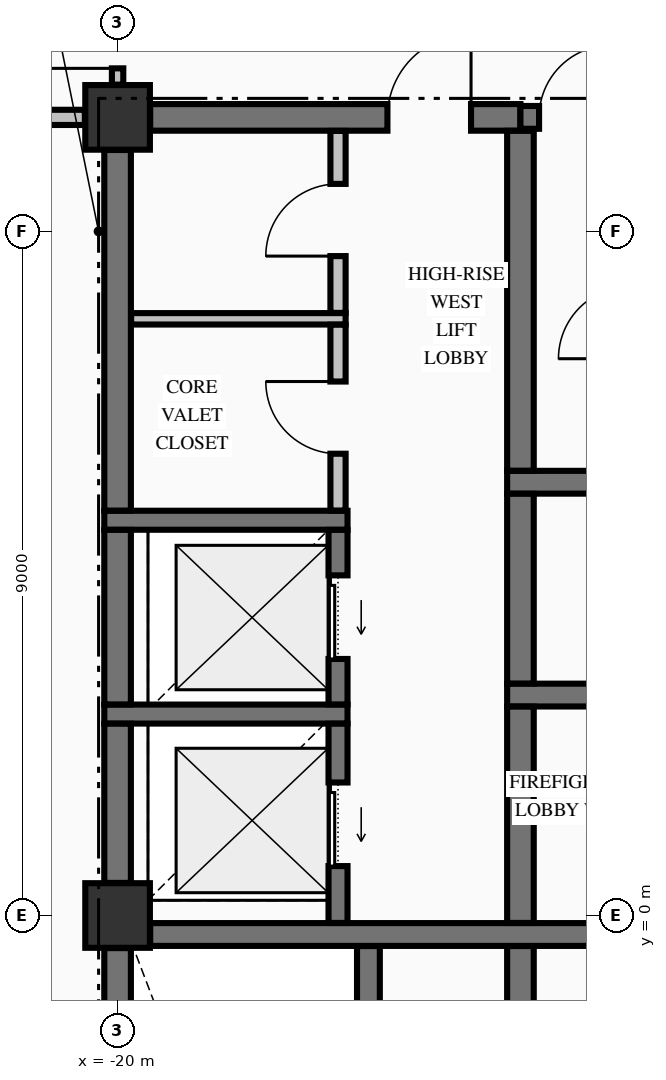
"""IFC4 building model, lengths in metres.
Left out: names, types, materials, properties, quantities, classifications, styles, units other than length and angle.
Written with IfcOpenShell. Run it as: python <this file> out.ifc"""

import sys

from ifc_helpers import new_model, si_unit, direction, frame, frame_2d, origin, origin_2d, place, context, subcontext, project, spatial, rectangle, extrude, element, fill, save


model = new_model("IFC4")
c1 = context("Model", 3, precision=1e-05, world=origin(), true_north=direction((0.0, 1.0)))
c2 = subcontext(c1, "Body", "Model", "MODEL_VIEW")
j1 = project(units=[si_unit("LENGTHUNIT", "METRE"), si_unit("PLANEANGLEUNIT", "RADIAN")], contexts=[c1])
p1 = place(None, origin())
s1 = spatial("IfcSite", under=j1, at=p1, CompositionType="ELEMENT")
p2 = place(p1, origin())
s2 = spatial("IfcBuilding", under=s1, at=p2, CompositionType="ELEMENT")
p3 = place(p2, frame((0.0, 0.0, 198.26)))
s3 = spatial("IfcBuildingStorey", under=s2, at=p3, CompositionType="ELEMENT", Elevation=198.26)
for number, where, z_axis, x_axis in (
    (1, (-20.0, 10.5, -0.25), (0.0, 0.0, 1.0), (1.0, 0.0, 0.0)),
    (2, (-20.0, 0.0, -0.25), (0.0, 0.0, 1.0), (1.0, 0.0, 0.0)),
):
    element("IfcColumn", number, at=place(p3, frame(where, z_axis=z_axis, x_axis=x_axis)), inside=s3, PredefinedType="COLUMN", context=c2, shape_type="SweptSolid", body=[
        extrude(rectangle(XDim=0.85, YDim=0.85, at=origin_2d()), origin(), (0.0, 0.0, 1.0), 3.4),
    ])
p4 = place(p3, frame((-19.571, -0.25, 0.0), z_axis=(0.0, 0.0, 1.0), x_axis=(1.0, 0.0, 0.0)))
e3 = element("IfcWall", 3, at=p4, inside=s3, PredefinedType="SHEAR", context=c2, shape_type="SweptSolid", body=[
    extrude(rectangle(XDim=8.142, YDim=0.3, at=frame_2d((4.071, 0.0))), origin(), (0.0, 0.0, 1.0), 3.15),
])
p5 = place(p4, frame((5.871, 0.0, 0.0)))
e4 = element("IfcOpeningElement", 4, at=p5, cuts=e3, PredefinedType="OPENING", context=c2, shape_type="SweptSolid", body=[
    extrude(rectangle(XDim=1.1, YDim=2.15, at=frame_2d((0.55, 1.075))), frame((0.0, 0.16, 0.0), z_axis=(0.0, -1.0, 0.0), x_axis=(1.0, 0.0, 0.0)), (0.0, 0.0, 1.0), 0.32),
])
p6 = place(p3, frame((-20.175, 2.65, 0.0), z_axis=(0.0, 0.0, 1.0), x_axis=(1.0, 0.0, 0.0)))
e5 = element("IfcWall", 5, at=p6, inside=s3, PredefinedType="SOLIDWALL", context=c2, shape_type="SweptSolid", body=[
    extrude(rectangle(XDim=3.2, YDim=0.25, at=frame_2d((1.6, 0.0))), origin(), (0.0, 0.0, 1.0), 3.15),
])
p7 = place(p3, frame((-14.875, 2.9, 0.0), z_axis=(0.0, 0.0, 1.0), x_axis=(1.0, 0.0, 0.0)))
e6 = element("IfcWall", 6, at=p7, inside=s3, PredefinedType="SHEAR", context=c2, shape_type="SweptSolid", body=[
    extrude(rectangle(XDim=4.025, YDim=0.3, at=frame_2d((2.012, 0.0))), origin(), (0.0, 0.0, 1.0), 3.15),
])
p8 = place(p7, frame((2.075, 0.0, 0.0)))
e7 = element("IfcOpeningElement", 7, at=p8, cuts=e6, PredefinedType="OPENING", context=c2, shape_type="SweptSolid", body=[
    extrude(rectangle(XDim=1.1, YDim=2.2, at=frame_2d((0.55, 1.1))), frame((0.0, 0.16, 0.0), z_axis=(0.0, -1.0, 0.0), x_axis=(1.0, 0.0, 0.0)), (0.0, 0.0, 1.0), 0.32),
])
p9 = place(p3, frame((-20.175, 5.2, 0.0), z_axis=(0.0, 0.0, 1.0), x_axis=(1.0, 0.0, 0.0)))
e8 = element("IfcWall", 8, at=p9, inside=s3, PredefinedType="SOLIDWALL", context=c2, shape_type="SweptSolid", body=[
    extrude(rectangle(XDim=3.2, YDim=0.25, at=frame_2d((1.6, 0.0))), origin(), (0.0, 0.0, 1.0), 3.15),
])
p10 = place(p3, frame((-14.875, 5.7, 0.0), z_axis=(0.0, 0.0, 1.0), x_axis=(1.0, 0.0, 0.0)))
e9 = element("IfcWall", 9, at=p10, inside=s3, PredefinedType="SHEAR", context=c2, shape_type="SweptSolid", body=[
    extrude(rectangle(XDim=4.025, YDim=0.3, at=frame_2d((2.012, 0.0))), origin(), (0.0, 0.0, 1.0), 3.15),
])
p11 = place(p3, frame((-19.571, 10.5, 0.0), z_axis=(0.0, 0.0, 1.0), x_axis=(1.0, 0.0, 0.0)))
e10 = element("IfcWall", 10, at=p11, inside=s3, PredefinedType="SHEAR", context=c2, shape_type="SweptSolid", body=[
    extrude(rectangle(XDim=4.871, YDim=0.35, at=frame_2d((2.436, 0.0))), origin(), (0.0, 0.0, 1.0), 3.15),
])
p12 = place(p11, frame((3.121, 0.0, 0.0)))
e11 = element("IfcOpeningElement", 11, at=p12, cuts=e10, PredefinedType="OPENING", context=c2, shape_type="SweptSolid", body=[
    extrude(rectangle(XDim=1.1, YDim=2.15, at=frame_2d((0.55, 1.075))), frame((0.0, 0.185, 0.0), z_axis=(0.0, -1.0, 0.0), x_axis=(1.0, 0.0, 0.0)), (0.0, 0.0, 1.0), 0.37),
])
p13 = place(p3, frame((-14.7, 10.5, 0.0), z_axis=(0.0, 0.0, 1.0), x_axis=(1.0, 0.0, 0.0)))
e12 = element("IfcWall", 12, at=p13, inside=s3, PredefinedType="SHEAR", context=c2, shape_type="SweptSolid", body=[
    extrude(rectangle(XDim=3.271, YDim=0.3, at=frame_2d((1.635, 0.0))), origin(), (0.0, 0.0, 1.0), 3.15),
])
p14 = place(p13, frame((0.245, 0.0, 0.0)))
e13 = element("IfcOpeningElement", 13, at=p14, cuts=e12, PredefinedType="OPENING", context=c2, shape_type="SweptSolid", body=[
    extrude(rectangle(XDim=0.95, YDim=2.15, at=frame_2d((0.475, 1.075))), frame((0.0, 0.16, 0.0), z_axis=(0.0, -1.0, 0.0), x_axis=(1.0, 0.0, 0.0)), (0.0, 0.0, 1.0), 0.32),
])
p15 = place(p3, frame((-19.822, 7.85, 0.0), z_axis=(0.0, 0.0, 1.0), x_axis=(1.0, 0.0, 0.0)))
e14 = element("IfcWall", 14, at=p15, inside=s3, PredefinedType="PARTITIONING", context=c2, shape_type="SweptSolid", body=[
    extrude(rectangle(XDim=2.822, YDim=0.15, at=frame_2d((1.411, 0.0))), origin(), (0.0, 0.0, 1.0), 3.15),
])
p16 = place(p3, frame((-26.835, 10.5, 0.0), z_axis=(0.0, 0.0, 1.0), x_axis=(1.0, 0.0, 0.0)))
e15 = element("IfcWall", 15, at=p16, inside=s3, PredefinedType="PARTITIONING", context=c2, shape_type="SweptSolid", body=[
    extrude(rectangle(XDim=6.404, YDim=0.2, at=frame_2d((3.202, 0.0))), origin(), (0.0, 0.0, 1.0), 3.15),
])
p17 = place(p16, frame((2.86, 0.0, 0.0)))
e16 = element("IfcOpeningElement", 16, at=p17, cuts=e15, PredefinedType="OPENING", context=c2, shape_type="SweptSolid", body=[
    extrude(rectangle(XDim=0.95, YDim=2.15, at=frame_2d((0.475, 1.075))), frame((0.0, 0.11, 0.0), z_axis=(0.0, -1.0, 0.0), x_axis=(1.0, 0.0, 0.0)), (0.0, 0.0, 1.0), 0.22),
])
p18 = place(p3, frame((-20.0, -9.521, 0.0), z_axis=(0.0, 0.0, 1.0), x_axis=(0.0, 1.0, 0.0)))
e17 = element("IfcWall", 17, at=p18, inside=s3, PredefinedType="SHEAR", context=c2, shape_type="SweptSolid", body=[
    extrude(rectangle(XDim=9.092, YDim=0.35, at=frame_2d((4.546, 0.0))), origin(), (0.0, 0.0, 1.0), 3.15),
])
p19 = place(p3, frame((-20.0, 0.429, 0.0), z_axis=(0.0, 0.0, 1.0), x_axis=(0.0, 1.0, 0.0)))
e18 = element("IfcWall", 18, at=p19, inside=s3, PredefinedType="SHEAR", context=c2, shape_type="SweptSolid", body=[
    extrude(rectangle(XDim=2.094, YDim=0.35, at=frame_2d((1.047, 0.0))), origin(), (0.0, 0.0, 1.0), 3.15),
])
p20 = place(p3, frame((-20.0, 2.777, 0.0), z_axis=(0.0, 0.0, 1.0), x_axis=(0.0, 1.0, 0.0)))
e19 = element("IfcWall", 19, at=p20, inside=s3, PredefinedType="SHEAR", context=c2, shape_type="SweptSolid", body=[
    extrude(rectangle(XDim=2.296, YDim=0.35, at=frame_2d((1.148, 0.0))), origin(), (0.0, 0.0, 1.0), 3.15),
])
p21 = place(p3, frame((-20.0, 5.327, 0.0), z_axis=(0.0, 0.0, 1.0), x_axis=(0.0, 1.0, 0.0)))
e20 = element("IfcWall", 20, at=p21, inside=s3, PredefinedType="SHEAR", context=c2, shape_type="SweptSolid", body=[
    extrude(rectangle(XDim=4.744, YDim=0.35, at=frame_2d((2.372, 0.0))), origin(), (0.0, 0.0, 1.0), 3.15),
])
p22 = place(p3, frame((-17.1, -0.098, 0.0), z_axis=(0.0, 0.0, 1.0), x_axis=(0.0, 1.0, 0.0)))
e21 = element("IfcWall", 21, at=p22, inside=s3, PredefinedType="SOLIDWALL", context=c2, shape_type="SweptSolid", body=[
    extrude(rectangle(XDim=2.621, YDim=0.25, at=frame_2d((1.311, 0.0))), origin(), (0.0, 0.0, 1.0), 3.15),
])
p23 = place(p22, frame((0.748, 0.0, 0.0)))
e22 = element("IfcOpeningElement", 22, at=p23, cuts=e21, PredefinedType="OPENING", context=c2, shape_type="SweptSolid", body=[
    extrude(rectangle(XDim=1.1, YDim=2.2, at=frame_2d((0.55, 1.1))), frame((0.0, 0.135, 0.0), z_axis=(0.0, -1.0, 0.0), x_axis=(1.0, 0.0, 0.0)), (0.0, 0.0, 1.0), 0.27),
])
p24 = place(p3, frame((-17.1, 2.777, 0.0), z_axis=(0.0, 0.0, 1.0), x_axis=(0.0, 1.0, 0.0)))
e23 = element("IfcWall", 23, at=p24, inside=s3, PredefinedType="SOLIDWALL", context=c2, shape_type="SweptSolid", body=[
    extrude(rectangle(XDim=2.296, YDim=0.25, at=frame_2d((1.148, 0.0))), origin(), (0.0, 0.0, 1.0), 3.15),
])
p25 = place(p24, frame((0.598, 0.0, 0.0)))
e24 = element("IfcOpeningElement", 24, at=p25, cuts=e23, PredefinedType="OPENING", context=c2, shape_type="SweptSolid", body=[
    extrude(rectangle(XDim=1.1, YDim=2.2, at=frame_2d((0.55, 1.1))), frame((0.0, 0.135, 0.0), z_axis=(0.0, -1.0, 0.0), x_axis=(1.0, 0.0, 0.0)), (0.0, 0.0, 1.0), 0.27),
])
p26 = place(p3, frame((-16.7, -9.773, 0.0), z_axis=(0.0, 0.0, 1.0), x_axis=(0.0, 1.0, 0.0)))
e25 = element("IfcWall", 25, at=p26, inside=s3, PredefinedType="SHEAR", context=c2, shape_type="SweptSolid", body=[
    extrude(rectangle(XDim=9.371, YDim=0.3, at=frame_2d((4.686, 0.0))), origin(), (0.0, 0.0, 1.0), 3.15),
])
p27 = place(p3, frame((-14.7, -9.773, 0.0), z_axis=(0.0, 0.0, 1.0), x_axis=(0.0, 1.0, 0.0)))
e26 = element("IfcWall", 26, at=p27, inside=s3, PredefinedType="SHEAR", context=c2, shape_type="SweptSolid", body=[
    extrude(rectangle(XDim=9.371, YDim=0.35, at=frame_2d((4.686, 0.0))), origin(), (0.0, 0.0, 1.0), 3.15),
])
p28 = place(p3, frame((-14.7, -0.098, 0.0), z_axis=(0.0, 0.0, 1.0), x_axis=(0.0, 1.0, 0.0)))
e27 = element("IfcWall", 27, at=p28, inside=s3, PredefinedType="SHEAR", context=c2, shape_type="SweptSolid", body=[
    extrude(rectangle(XDim=2.846, YDim=0.35, at=frame_2d((1.423, 0.0))), origin(), (0.0, 0.0, 1.0), 3.15),
])
p29 = place(p3, frame((-14.7, 3.052, 0.0), z_axis=(0.0, 0.0, 1.0), x_axis=(0.0, 1.0, 0.0)))
e28 = element("IfcWall", 28, at=p29, inside=s3, PredefinedType="SHEAR", context=c2, shape_type="SweptSolid", body=[
    extrude(rectangle(XDim=2.496, YDim=0.35, at=frame_2d((1.248, 0.0))), origin(), (0.0, 0.0, 1.0), 3.15),
])
p30 = place(p3, frame((-14.7, 5.852, 0.0), z_axis=(0.0, 0.0, 1.0), x_axis=(0.0, 1.0, 0.0)))
e29 = element("IfcWall", 29, at=p30, inside=s3, PredefinedType="SHEAR", context=c2, shape_type="SweptSolid", body=[
    extrude(rectangle(XDim=4.471, YDim=0.35, at=frame_2d((2.235, 0.0))), origin(), (0.0, 0.0, 1.0), 3.15),
])
p31 = place(p3, frame((-20.0, 10.931, 0.0), z_axis=(0.0, 0.0, 1.0), x_axis=(0.0, 1.0, 0.0)))
e30 = element("IfcWall", 30, at=p31, inside=s3, PredefinedType="PARTITIONING", context=c2, shape_type="SweptSolid", body=[
    extrude(rectangle(XDim=1.716, YDim=0.15, at=frame_2d((0.858, 0.0))), origin(), (0.0, 0.0, 1.0), 2.342),
])
p32 = place(p31, frame((0.214, 0.0, 0.0)))
e31 = element("IfcOpeningElement", 31, at=p32, cuts=e30, PredefinedType="OPENING", context=c2, shape_type="SweptSolid", body=[
    extrude(rectangle(XDim=0.95, YDim=2.15, at=frame_2d((0.475, 1.075))), frame((0.0, 0.085, 0.0), z_axis=(0.0, -1.0, 0.0), x_axis=(1.0, 0.0, 0.0)), (0.0, 0.0, 1.0), 0.17),
])
p33 = place(p3, frame((-17.1, 5.328, 0.0), z_axis=(0.0, 0.0, 1.0), x_axis=(0.0, 1.0, 0.0)))
e32 = element("IfcWall", 32, at=p33, inside=s3, PredefinedType="PARTITIONING", context=c2, shape_type="SweptSolid", body=[
    extrude(rectangle(XDim=2.444, YDim=0.2, at=frame_2d((1.222, 0.0))), origin(), (0.0, 0.0, 1.0), 3.15),
])
p34 = place(p33, frame((0.747, 0.0, 0.0)))
e33 = element("IfcOpeningElement", 33, at=p34, cuts=e32, PredefinedType="OPENING", context=c2, shape_type="SweptSolid", body=[
    extrude(rectangle(XDim=0.95, YDim=2.15, at=frame_2d((0.475, 1.075))), frame((0.0, 0.11, 0.0), z_axis=(0.0, -1.0, 0.0), x_axis=(1.0, 0.0, 0.0)), (0.0, 0.0, 1.0), 0.22),
])
p35 = place(p3, frame((-17.1, 7.928, 0.0), z_axis=(0.0, 0.0, 1.0), x_axis=(0.0, 1.0, 0.0)))
e34 = element("IfcWall", 34, at=p35, inside=s3, PredefinedType="PARTITIONING", context=c2, shape_type="SweptSolid", body=[
    extrude(rectangle(XDim=2.394, YDim=0.2, at=frame_2d((1.197, 0.0))), origin(), (0.0, 0.0, 1.0), 3.15),
])
p36 = place(p35, frame((0.747, 0.0, 0.0)))
e35 = element("IfcOpeningElement", 35, at=p36, cuts=e34, PredefinedType="OPENING", context=c2, shape_type="SweptSolid", body=[
    extrude(rectangle(XDim=0.95, YDim=2.15, at=frame_2d((0.475, 1.075))), frame((0.0, 0.11, 0.0), z_axis=(0.0, -1.0, 0.0), x_axis=(1.0, 0.0, 0.0)), (0.0, 0.0, 1.0), 0.22),
])
p37 = place(p14, origin())
e36 = element("IfcDoor", 36, at=p37, inside=s3, OperationType="SINGLE_SWING_RIGHT", PredefinedType="DOOR", context=c2, shape_type="SweptSolid", body=[
    extrude(rectangle(XDim=0.95, YDim=2.15, at=frame_2d((0.475, 1.075))), frame((0.0, 0.025, 0.0), z_axis=(0.0, -1.0, 0.0), x_axis=(1.0, 0.0, 0.0)), (0.0, 0.0, 1.0), 0.05),
])
fill(e13, e36)
p38 = place(p23, origin())
e37 = element("IfcDoor", 37, at=p38, inside=s3, OperationType="SLIDING_TO_LEFT", PredefinedType="DOOR", context=c2, shape_type="SweptSolid", body=[
    extrude(rectangle(XDim=1.1, YDim=2.2, at=frame_2d((0.55, 1.1))), frame((0.0, 0.025, 0.0), z_axis=(0.0, -1.0, 0.0), x_axis=(1.0, 0.0, 0.0)), (0.0, 0.0, 1.0), 0.05),
])
fill(e22, e37)
p39 = place(p25, origin())
e38 = element("IfcDoor", 38, at=p39, inside=s3, OperationType="SLIDING_TO_LEFT", PredefinedType="DOOR", context=c2, shape_type="SweptSolid", body=[
    extrude(rectangle(XDim=1.1, YDim=2.2, at=frame_2d((0.55, 1.1))), frame((0.0, 0.025, 0.0), z_axis=(0.0, -1.0, 0.0), x_axis=(1.0, 0.0, 0.0)), (0.0, 0.0, 1.0), 0.05),
])
fill(e24, e38)
p40 = place(p12, origin())
e39 = element("IfcDoor", 39, at=p40, inside=s3, OperationType="SINGLE_SWING_RIGHT", PredefinedType="DOOR", context=c2, shape_type="SweptSolid", body=[
    extrude(rectangle(XDim=1.1, YDim=2.15, at=frame_2d((0.55, 1.075))), frame((0.0, 0.025, 0.0), z_axis=(0.0, -1.0, 0.0), x_axis=(1.0, 0.0, 0.0)), (0.0, 0.0, 1.0), 0.05),
])
fill(e11, e39)
p41 = place(p36, origin())
e40 = element("IfcDoor", 40, at=p41, inside=s3, OperationType="SINGLE_SWING_LEFT", PredefinedType="DOOR", context=c2, shape_type="SweptSolid", body=[
    extrude(rectangle(XDim=0.95, YDim=2.15, at=frame_2d((0.475, 1.075))), frame((0.0, 0.025, 0.0), z_axis=(0.0, -1.0, 0.0), x_axis=(1.0, 0.0, 0.0)), (0.0, 0.0, 1.0), 0.05),
])
fill(e35, e40)
p42 = place(p34, origin())
e41 = element("IfcDoor", 41, at=p42, inside=s3, OperationType="SINGLE_SWING_RIGHT", PredefinedType="DOOR", context=c2, shape_type="SweptSolid", body=[
    extrude(rectangle(XDim=0.95, YDim=2.15, at=frame_2d((0.475, 1.075))), frame((0.0, 0.025, 0.0), z_axis=(0.0, -1.0, 0.0), x_axis=(1.0, 0.0, 0.0)), (0.0, 0.0, 1.0), 0.05),
])
fill(e33, e41)
p43 = place(p32, origin())
e42 = element("IfcDoor", 42, at=p43, inside=s3, OperationType="SINGLE_SWING_LEFT", PredefinedType="DOOR", context=c2, shape_type="SweptSolid", body=[
    extrude(rectangle(XDim=0.95, YDim=2.15, at=frame_2d((0.475, 1.075))), frame((0.0, 0.025, 0.0), z_axis=(0.0, -1.0, 0.0), x_axis=(1.0, 0.0, 0.0)), (0.0, 0.0, 1.0), 0.05),
])
fill(e31, e42)
save(model, sys.argv[1])
